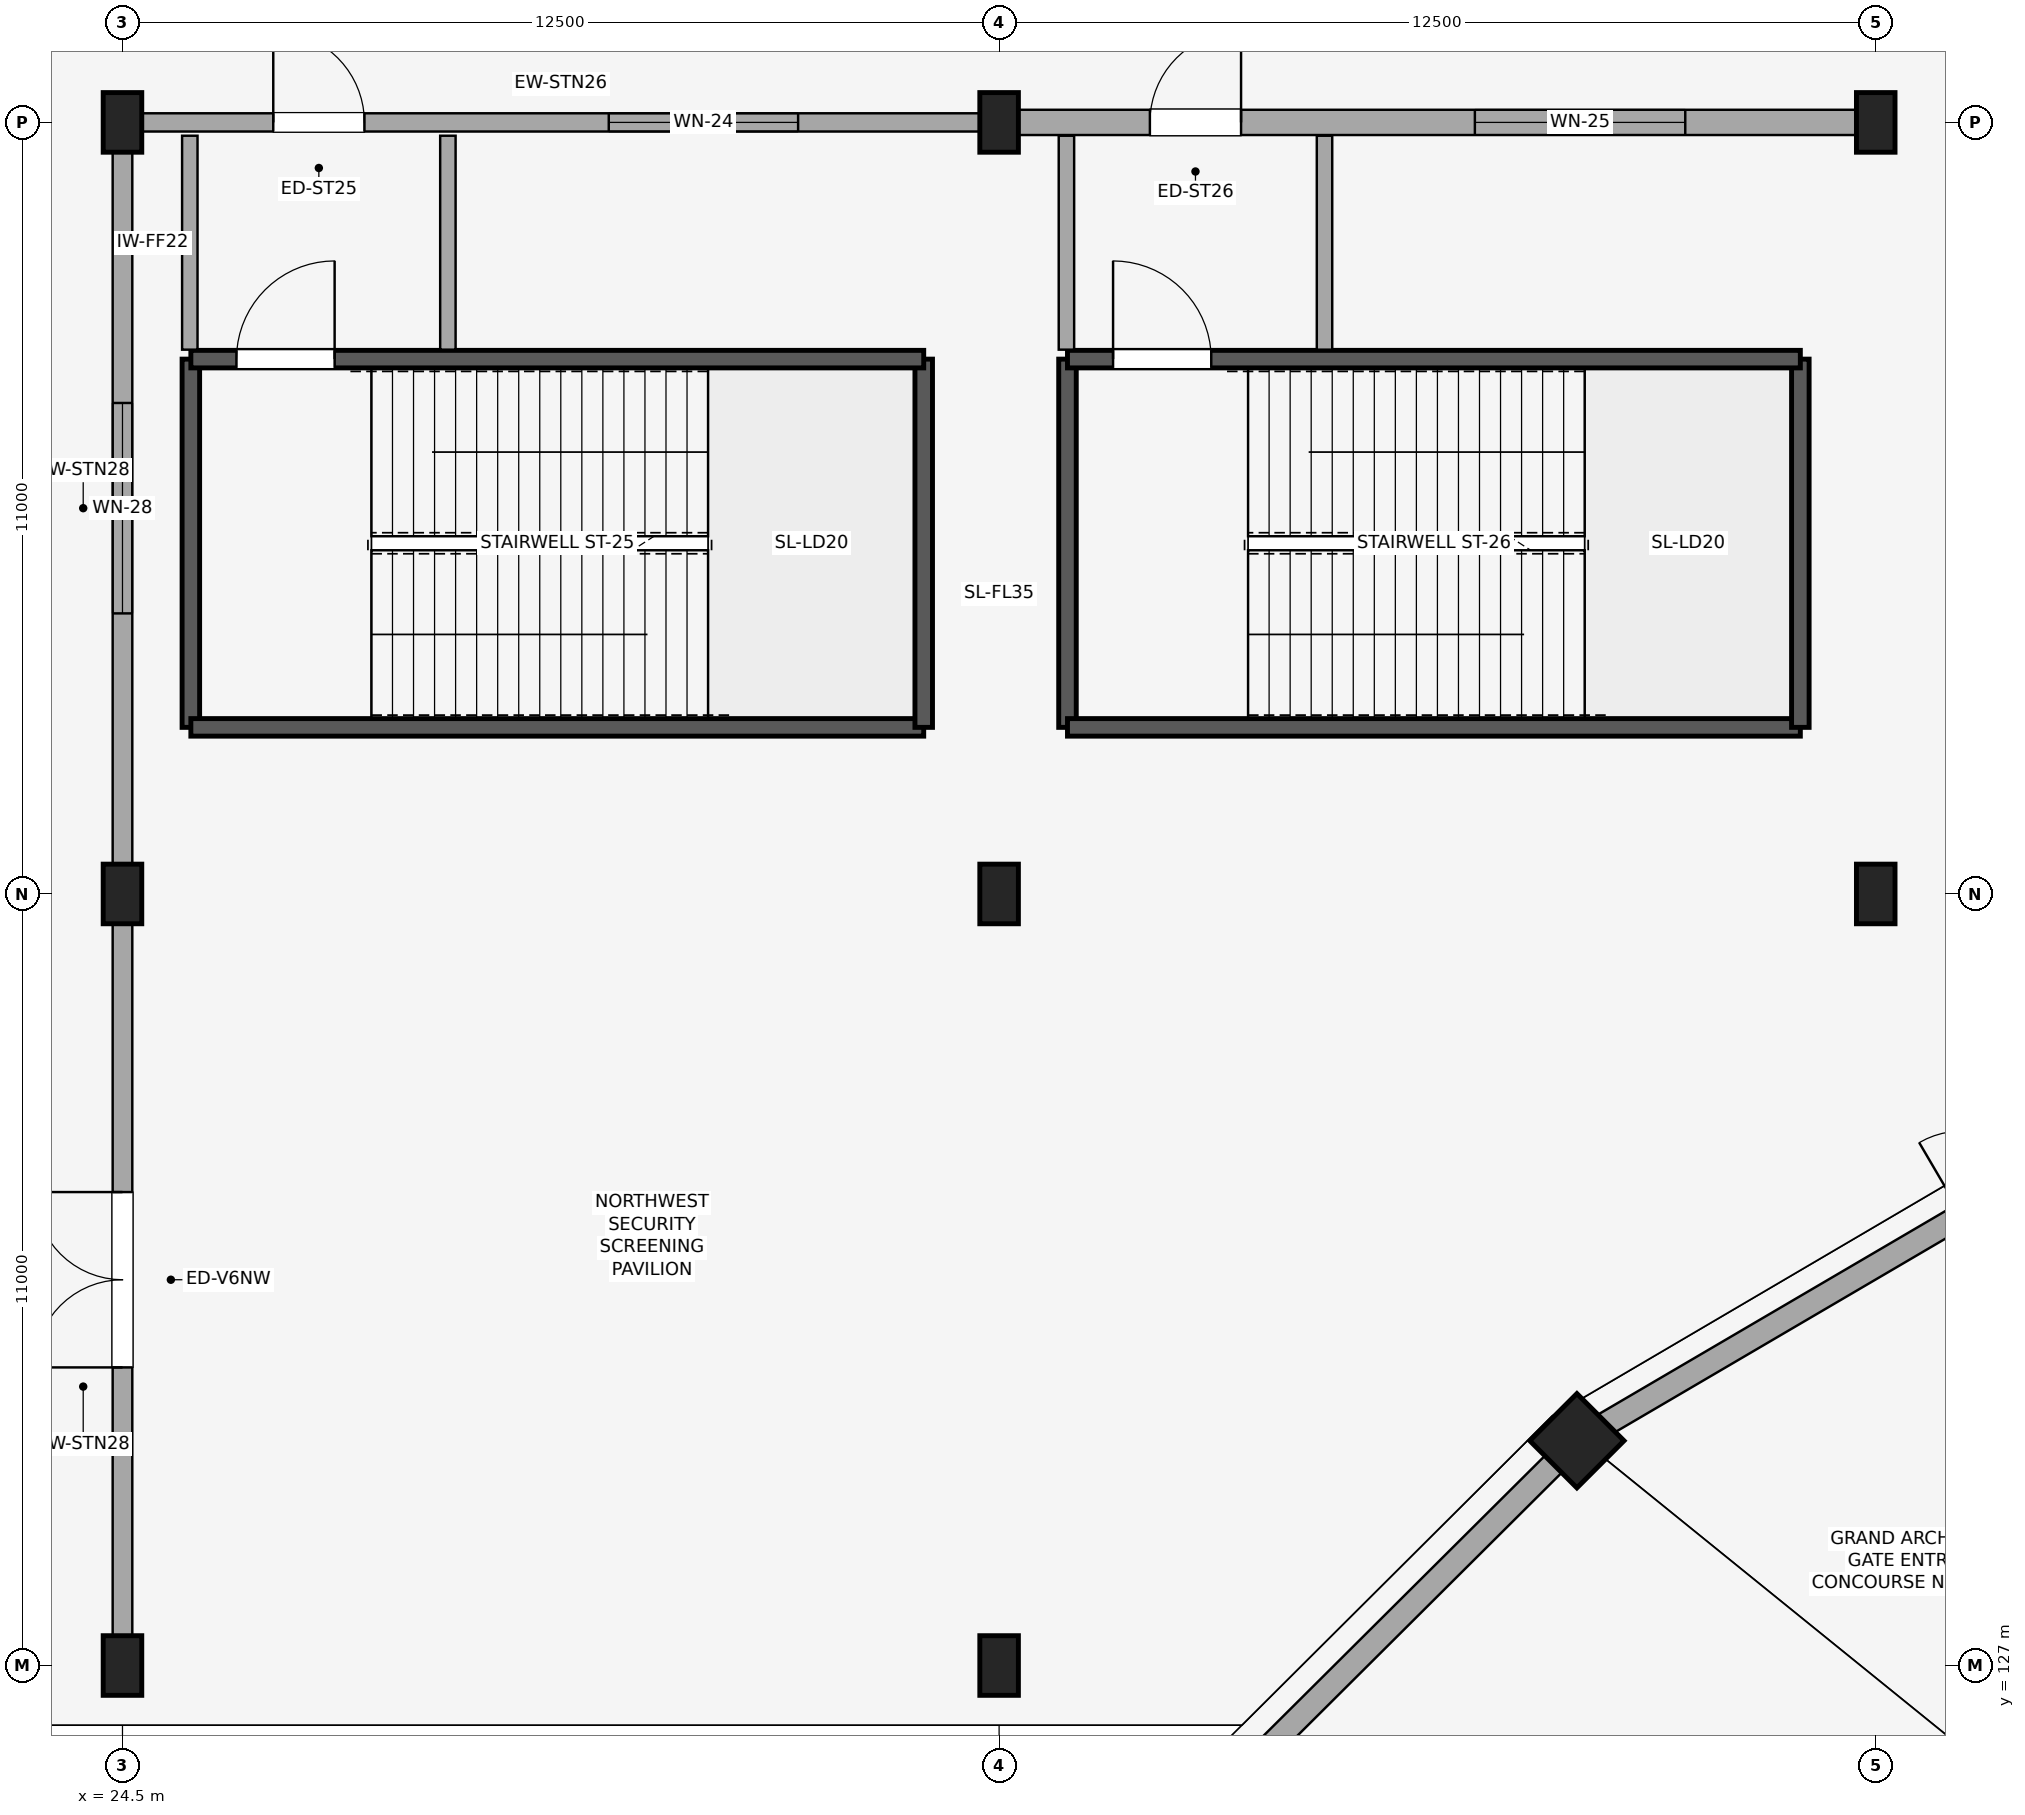
"""IFC4 building model, lengths in metres.
Left out: names, types, materials, properties, quantities, classifications, styles, units other than length and angle.
Written with IfcOpenShell. Run it as: python <this file> out.ifc"""

import sys

from ifc_helpers import new_model, si_unit, direction, frame, frame_2d, origin, origin_2d, place, context, subcontext, project, spatial, rectangle, circle, extrude, element, fill, save


model = new_model("IFC4")
c1 = context("Model", 3, precision=1e-05, world=origin(), true_north=direction((0.0, 1.0)))
c2 = subcontext(c1, "Body", "Model", "MODEL_VIEW")
j1 = project(units=[si_unit("LENGTHUNIT", "METRE"), si_unit("PLANEANGLEUNIT", "RADIAN")], contexts=[c1])
p1 = place(None, origin())
s1 = spatial("IfcSite", under=j1, at=p1, CompositionType="ELEMENT")
p2 = place(p1, origin())
s2 = spatial("IfcBuilding", under=s1, at=p2, CompositionType="ELEMENT")
p3 = place(p2, origin())
s3 = spatial("IfcBuildingStorey", under=s2, at=p3, CompositionType="ELEMENT", Elevation=0.0)
p4 = place(p3, frame((45.239, 130.205, 0.0), z_axis=(0.0, 0.0, 1.0), x_axis=(-0.707106781187, 0.707106781187, 0.0)))
e1 = element("IfcColumn", 1, at=p4, inside=s3, PredefinedType="COLUMN", context=c2, shape_type="SweptSolid", body=[
    extrude(circle(Radius=0.475, at=origin_2d()), origin(), (0.0, 0.0, 1.0), 5.4),
])
for number, where, z_axis, x_axis in (
    (2, (24.5, 127.0, 0.0), (0.0, 0.0, 1.0), (1.0, 0.0, 0.0)),
    (3, (24.5, 138.0, 0.0), (0.0, 0.0, 1.0), (1.0, 0.0, 0.0)),
    (4, (24.5, 149.0, 0.0), (0.0, 0.0, 1.0), (1.0, 0.0, 0.0)),
    (5, (37.0, 127.0, 0.0), (0.0, 0.0, 1.0), (1.0, 0.0, 0.0)),
    (6, (37.0, 138.0, 0.0), (0.0, 0.0, 1.0), (1.0, 0.0, 0.0)),
    (7, (37.0, 149.0, 0.0), (0.0, 0.0, 1.0), (1.0, 0.0, 0.0)),
    (8, (49.5, 138.0, 0.0), (0.0, 0.0, 1.0), (1.0, 0.0, 0.0)),
    (9, (49.5, 149.0, 0.0), (0.0, 0.0, 1.0), (1.0, 0.0, 0.0)),
):
    element("IfcColumn", number, at=place(p3, frame(where, z_axis=z_axis, x_axis=x_axis)), inside=s3, PredefinedType="PILASTER", context=c2, shape_type="SweptSolid", body=[
        extrude(rectangle(XDim=0.55, YDim=0.85, at=origin_2d()), origin(), (0.0, 0.0, 1.0), 5.4),
    ])
p5 = place(p3, frame((64.103, 141.255, 0.0), z_axis=(0.0, 0.0, 1.0), x_axis=(-0.862843632099, -0.505470935413, 0.0)))
e10 = element("IfcWall", 10, at=p5, inside=s3, PredefinedType="STANDARD", context=c2, shape_type="SweptSolid", body=[
    extrude(rectangle(XDim=21.403, YDim=0.34, at=frame_2d((10.701, 0.0))), origin(), (0.0, 0.0, 1.0), 3.85),
])
p6 = place(p5, frame((5.613, 0.0, 0.0)))
e11 = element("IfcOpeningElement", 11, at=p6, cuts=e10, PredefinedType="OPENING", context=c2, shape_type="SweptSolid", body=[
    extrude(rectangle(XDim=1.3, YDim=2.2, at=frame_2d((0.65, 1.1))), frame((0.0, 0.18, 0.0), z_axis=(0.0, -1.0, 0.0), x_axis=(1.0, 0.0, 0.0)), (0.0, 0.0, 1.0), 0.36),
])
p7 = place(p5, frame((13.103, 0.0, 0.0)))
e12 = element("IfcOpeningElement", 12, at=p7, cuts=e10, PredefinedType="OPENING", context=c2, shape_type="SweptSolid", body=[
    extrude(rectangle(XDim=2.4, YDim=2.4, at=frame_2d((1.2, 1.2))), frame((0.0, 0.18, 0.0), z_axis=(0.0, -1.0, 0.0), x_axis=(1.0, 0.0, 0.0)), (0.0, 0.0, 1.0), 0.36),
])
p8 = place(p3, frame((44.913, 129.88, 0.0), z_axis=(0.0, 0.0, 1.0), x_axis=(-0.708905356977, -0.705303618911, 0.0)))
e13 = element("IfcWall", 13, at=p8, inside=s3, PredefinedType="STANDARD", context=c2, shape_type="SweptSolid", body=[
    extrude(rectangle(XDim=19.928, YDim=0.34, at=frame_2d((9.964, 0.0))), origin(), (0.0, 0.0, 1.0), 3.85),
])
p9 = place(p8, frame((8.739, 0.0, 0.0)))
e14 = element("IfcOpeningElement", 14, at=p9, cuts=e13, PredefinedType="OPENING", context=c2, shape_type="SweptSolid", body=[
    extrude(rectangle(XDim=2.45, YDim=2.4, at=frame_2d((1.225, 1.2))), frame((0.0, 0.18, 0.0), z_axis=(0.0, -1.0, 0.0), x_axis=(1.0, 0.0, 0.0)), (0.0, 0.0, 1.0), 0.36),
])
p10 = place(p3, frame((24.772, 149.0, 0.0), z_axis=(0.0, 0.0, 1.0), x_axis=(1.0, 0.0, 0.0)))
e15 = element("IfcWall", 15, at=p10, inside=s3, PredefinedType="STANDARD", context=c2, shape_type="SweptSolid", body=[
    extrude(rectangle(XDim=11.956, YDim=0.26, at=frame_2d((5.978, 0.0))), origin(), (0.0, 0.0, 1.0), 4.48),
])
p11 = place(p10, frame((1.878, 0.0, 0.0)))
e16 = element("IfcOpeningElement", 16, at=p11, cuts=e15, PredefinedType="OPENING", context=c2, shape_type="SweptSolid", body=[
    extrude(rectangle(XDim=1.3, YDim=2.2, at=frame_2d((0.65, 1.1))), frame((0.0, 0.14, 0.0), z_axis=(0.0, -1.0, 0.0), x_axis=(1.0, 0.0, 0.0)), (0.0, 0.0, 1.0), 0.28),
])
p12 = place(p10, frame((6.662, 0.0, 0.95)))
e17 = element("IfcOpeningElement", 17, at=p12, cuts=e15, PredefinedType="OPENING", context=c2, shape_type="SweptSolid", body=[
    extrude(rectangle(XDim=2.7, YDim=2.1, at=frame_2d((1.35, 1.05))), frame((0.0, 0.14, 0.0), z_axis=(0.0, -1.0, 0.0), x_axis=(1.0, 0.0, 0.0)), (0.0, 0.0, 1.0), 0.28),
])
p13 = place(p3, frame((37.272, 149.0, 0.0), z_axis=(0.0, 0.0, 1.0), x_axis=(1.0, 0.0, 0.0)))
e18 = element("IfcWall", 18, at=p13, inside=s3, PredefinedType="STANDARD", context=c2, shape_type="SweptSolid", body=[
    extrude(rectangle(XDim=11.956, YDim=0.36, at=frame_2d((5.978, 0.0))), origin(), (0.0, 0.0, 1.0), 4.48),
])
p14 = place(p13, frame((1.878, 0.0, 0.0)))
e19 = element("IfcOpeningElement", 19, at=p14, cuts=e18, PredefinedType="OPENING", context=c2, shape_type="SweptSolid", body=[
    extrude(rectangle(XDim=1.3, YDim=2.2, at=frame_2d((0.65, 1.1))), frame((0.0, 0.19, 0.0), z_axis=(0.0, -1.0, 0.0), x_axis=(1.0, 0.0, 0.0)), (0.0, 0.0, 1.0), 0.38),
])
p15 = place(p13, frame((6.512, 0.0, 0.95)))
e20 = element("IfcOpeningElement", 20, at=p15, cuts=e18, PredefinedType="OPENING", context=c2, shape_type="SweptSolid", body=[
    extrude(rectangle(XDim=3.0, YDim=1.35, at=frame_2d((1.5, 0.675))), frame((0.0, 0.19, 0.0), z_axis=(0.0, -1.0, 0.0), x_axis=(1.0, 0.0, 0.0)), (0.0, 0.0, 1.0), 0.38),
])
p16 = place(p3, frame((24.5, 127.422, 0.0), z_axis=(0.0, 0.0, 1.0), x_axis=(0.0, 1.0, 0.0)))
e21 = element("IfcWall", 21, at=p16, inside=s3, PredefinedType="STANDARD", context=c2, shape_type="SweptSolid", body=[
    extrude(rectangle(XDim=10.156, YDim=0.28, at=frame_2d((5.078, 0.0))), origin(), (0.0, 0.0, 1.0), 4.48),
])
p17 = place(p16, frame((3.828, 0.0, 0.0)))
e22 = element("IfcOpeningElement", 22, at=p17, cuts=e21, PredefinedType="OPENING", context=c2, shape_type="SweptSolid", body=[
    extrude(rectangle(XDim=2.5, YDim=2.5, at=frame_2d((1.25, 1.25))), frame((0.0, 0.15, 0.0), z_axis=(0.0, -1.0, 0.0), x_axis=(1.0, 0.0, 0.0)), (0.0, 0.0, 1.0), 0.3),
])
p18 = place(p3, frame((24.5, 138.422, 0.0), z_axis=(0.0, 0.0, 1.0), x_axis=(0.0, 1.0, 0.0)))
e23 = element("IfcWall", 23, at=p18, inside=s3, PredefinedType="STANDARD", context=c2, shape_type="SweptSolid", body=[
    extrude(rectangle(XDim=10.156, YDim=0.28, at=frame_2d((5.078, 0.0))), origin(), (0.0, 0.0, 1.0), 4.48),
])
p19 = place(p18, frame((3.578, 0.0, 0.95)))
e24 = element("IfcOpeningElement", 24, at=p19, cuts=e23, PredefinedType="OPENING", context=c2, shape_type="SweptSolid", body=[
    extrude(rectangle(XDim=3.0, YDim=2.1, at=frame_2d((1.5, 1.05))), frame((0.0, 0.15, 0.0), z_axis=(0.0, -1.0, 0.0), x_axis=(1.0, 0.0, 0.0)), (0.0, 0.0, 1.0), 0.3),
])
p20 = place(p3, frame((25.475, 145.625, 0.0), z_axis=(0.0, 0.0, 1.0), x_axis=(0.0, -1.0, 0.0)))
e25 = element("IfcWall", 25, at=p20, inside=s3, PredefinedType="SHEAR", context=c2, shape_type="SweptSolid", body=[
    extrude(rectangle(XDim=5.25, YDim=0.25, at=frame_2d((2.625, 0.0))), origin(), (0.0, 0.0, 1.0), 5.1),
])
p21 = place(p3, frame((25.475, 140.375, 0.0), z_axis=(0.0, 0.0, 1.0), x_axis=(1.0, 0.0, 0.0)))
e26 = element("IfcWall", 26, at=p21, inside=s3, PredefinedType="SHEAR", context=c2, shape_type="SweptSolid", body=[
    extrude(rectangle(XDim=10.45, YDim=0.25, at=frame_2d((5.225, 0.0))), origin(), (0.0, 0.0, 1.0), 5.1),
])
p22 = place(p3, frame((35.925, 140.375, 0.0), z_axis=(0.0, 0.0, 1.0), x_axis=(0.0, 1.0, 0.0)))
e27 = element("IfcWall", 27, at=p22, inside=s3, PredefinedType="SHEAR", context=c2, shape_type="SweptSolid", body=[
    extrude(rectangle(XDim=5.25, YDim=0.25, at=frame_2d((2.625, 0.0))), origin(), (0.0, 0.0, 1.0), 5.1),
])
p23 = place(p3, frame((35.925, 145.625, 0.0), z_axis=(0.0, 0.0, 1.0), x_axis=(-1.0, 0.0, 0.0)))
e28 = element("IfcWall", 28, at=p23, inside=s3, PredefinedType="SHEAR", context=c2, shape_type="SweptSolid", body=[
    extrude(rectangle(XDim=10.45, YDim=0.25, at=frame_2d((5.225, 0.0))), origin(), (0.0, 0.0, 1.0), 5.1),
])
p24 = place(p23, frame((8.4, 0.0, 0.0)))
e29 = element("IfcOpeningElement", 29, at=p24, cuts=e28, PredefinedType="OPENING", context=c2, shape_type="SweptSolid", body=[
    extrude(rectangle(XDim=1.4, YDim=2.2, at=frame_2d((0.7, 1.1))), frame((0.0, 0.135, 0.0), z_axis=(0.0, -1.0, 0.0), x_axis=(1.0, 0.0, 0.0)), (0.0, 0.0, 1.0), 0.27),
])
for number, where, z_axis, x_axis in (
    (30, (25.46, 145.76, 0.0), (0.0, 0.0, 1.0), (0.0, 1.0, 0.0)),
    (31, (29.14, 145.76, 0.0), (0.0, 0.0, 1.0), (0.0, 1.0, 0.0)),
):
    element("IfcWall", number, at=place(p3, frame(where, z_axis=z_axis, x_axis=x_axis)), inside=s3, PredefinedType="PARTITIONING", context=c2, shape_type="SweptSolid", body=[
        extrude(rectangle(XDim=3.05, YDim=0.22, at=frame_2d((1.525, 0.0))), origin(), (0.0, 0.0, 1.0), 3.69),
    ])
p25 = place(p3, frame((37.975, 145.625, 0.0), z_axis=(0.0, 0.0, 1.0), x_axis=(0.0, -1.0, 0.0)))
e32 = element("IfcWall", 32, at=p25, inside=s3, PredefinedType="SHEAR", context=c2, shape_type="SweptSolid", body=[
    extrude(rectangle(XDim=5.25, YDim=0.25, at=frame_2d((2.625, 0.0))), origin(), (0.0, 0.0, 1.0), 5.1),
])
p26 = place(p3, frame((37.975, 140.375, 0.0), z_axis=(0.0, 0.0, 1.0), x_axis=(1.0, 0.0, 0.0)))
e33 = element("IfcWall", 33, at=p26, inside=s3, PredefinedType="SHEAR", context=c2, shape_type="SweptSolid", body=[
    extrude(rectangle(XDim=10.45, YDim=0.25, at=frame_2d((5.225, 0.0))), origin(), (0.0, 0.0, 1.0), 5.1),
])
p27 = place(p3, frame((48.425, 140.375, 0.0), z_axis=(0.0, 0.0, 1.0), x_axis=(0.0, 1.0, 0.0)))
e34 = element("IfcWall", 34, at=p27, inside=s3, PredefinedType="SHEAR", context=c2, shape_type="SweptSolid", body=[
    extrude(rectangle(XDim=5.25, YDim=0.25, at=frame_2d((2.625, 0.0))), origin(), (0.0, 0.0, 1.0), 5.1),
])
p28 = place(p3, frame((48.425, 145.625, 0.0), z_axis=(0.0, 0.0, 1.0), x_axis=(-1.0, 0.0, 0.0)))
e35 = element("IfcWall", 35, at=p28, inside=s3, PredefinedType="SHEAR", context=c2, shape_type="SweptSolid", body=[
    extrude(rectangle(XDim=10.45, YDim=0.25, at=frame_2d((5.225, 0.0))), origin(), (0.0, 0.0, 1.0), 5.1),
])
p29 = place(p28, frame((8.4, 0.0, 0.0)))
e36 = element("IfcOpeningElement", 36, at=p29, cuts=e35, PredefinedType="OPENING", context=c2, shape_type="SweptSolid", body=[
    extrude(rectangle(XDim=1.4, YDim=2.2, at=frame_2d((0.7, 1.1))), frame((0.0, 0.135, 0.0), z_axis=(0.0, -1.0, 0.0), x_axis=(1.0, 0.0, 0.0)), (0.0, 0.0, 1.0), 0.27),
])
for number, where, z_axis, x_axis in (
    (37, (37.96, 145.76, 0.0), (0.0, 0.0, 1.0), (0.0, 1.0, 0.0)),
    (38, (41.64, 145.76, 0.0), (0.0, 0.0, 1.0), (0.0, 1.0, 0.0)),
):
    element("IfcWall", number, at=place(p3, frame(where, z_axis=z_axis, x_axis=x_axis)), inside=s3, PredefinedType="PARTITIONING", context=c2, shape_type="SweptSolid", body=[
        extrude(rectangle(XDim=3.05, YDim=0.22, at=frame_2d((1.525, 0.0))), origin(), (0.0, 0.0, 1.0), 3.69),
    ])
p30 = place(p11, origin())
e39 = element("IfcDoor", 39, at=p30, inside=s3, OperationType="SINGLE_SWING_LEFT", PredefinedType="DOOR", context=c2, shape_type="SweptSolid", body=[
    extrude(rectangle(XDim=1.3, YDim=2.2, at=frame_2d((0.65, 1.1))), frame((0.0, 0.025, 0.0), z_axis=(0.0, -1.0, 0.0), x_axis=(1.0, 0.0, 0.0)), (0.0, 0.0, 1.0), 0.05),
])
fill(e16, e39)
p31 = place(p12, origin())
e40 = element("IfcWindow", 40, at=p31, inside=s3, PartitioningType="SINGLE_PANEL", PredefinedType="WINDOW", context=c2, shape_type="SweptSolid", body=[
    extrude(rectangle(XDim=2.7, YDim=2.1, at=frame_2d((1.35, 1.05))), frame((0.0, 0.03, 0.0), z_axis=(0.0, -1.0, 0.0), x_axis=(1.0, 0.0, 0.0)), (0.0, 0.0, 1.0), 0.06),
])
fill(e17, e40)
p32 = place(p14, origin())
e41 = element("IfcDoor", 41, at=p32, inside=s3, OperationType="SINGLE_SWING_RIGHT", PredefinedType="DOOR", context=c2, shape_type="SweptSolid", body=[
    extrude(rectangle(XDim=1.3, YDim=2.2, at=frame_2d((0.65, 1.1))), frame((0.0, 0.025, 0.0), z_axis=(0.0, -1.0, 0.0), x_axis=(1.0, 0.0, 0.0)), (0.0, 0.0, 1.0), 0.05),
])
fill(e19, e41)
p33 = place(p15, origin())
e42 = element("IfcWindow", 42, at=p33, inside=s3, PartitioningType="SINGLE_PANEL", PredefinedType="WINDOW", context=c2, shape_type="SweptSolid", body=[
    extrude(rectangle(XDim=3.0, YDim=1.35, at=frame_2d((1.5, 0.675))), frame((0.0, 0.03, 0.0), z_axis=(0.0, -1.0, 0.0), x_axis=(1.0, 0.0, 0.0)), (0.0, 0.0, 1.0), 0.06),
])
fill(e20, e42)
p34 = place(p17, origin())
e43 = element("IfcDoor", 43, at=p34, inside=s3, OperationType="DOUBLE_DOOR_SINGLE_SWING", PredefinedType="DOOR", context=c2, shape_type="SweptSolid", body=[
    extrude(rectangle(XDim=2.5, YDim=2.5, at=frame_2d((1.25, 1.25))), frame((0.0, 0.025, 0.0), z_axis=(0.0, -1.0, 0.0), x_axis=(1.0, 0.0, 0.0)), (0.0, 0.0, 1.0), 0.05),
])
fill(e22, e43)
p35 = place(p19, origin())
e44 = element("IfcWindow", 44, at=p35, inside=s3, PartitioningType="SINGLE_PANEL", PredefinedType="WINDOW", context=c2, shape_type="SweptSolid", body=[
    extrude(rectangle(XDim=3.0, YDim=2.1, at=frame_2d((1.5, 1.05))), frame((0.0, 0.03, 0.0), z_axis=(0.0, -1.0, 0.0), x_axis=(1.0, 0.0, 0.0)), (0.0, 0.0, 1.0), 0.06),
])
fill(e24, e44)
p36 = place(p24, frame((1.4, 0.0, 0.0), z_axis=(0.0, 0.0, 1.0), x_axis=(-1.0, 0.0, 0.0)))
e45 = element("IfcDoor", 45, at=p36, inside=s3, OperationType="SINGLE_SWING_RIGHT", PredefinedType="DOOR", context=c2, shape_type="SweptSolid", body=[
    extrude(rectangle(XDim=1.4, YDim=2.2, at=frame_2d((0.7, 1.1))), frame((0.0, 0.025, 0.0), z_axis=(0.0, -1.0, 0.0), x_axis=(1.0, 0.0, 0.0)), (0.0, 0.0, 1.0), 0.05),
])
fill(e29, e45)
p37 = place(p29, frame((1.4, 0.0, 0.0), z_axis=(0.0, 0.0, 1.0), x_axis=(-1.0, 0.0, 0.0)))
e46 = element("IfcDoor", 46, at=p37, inside=s3, OperationType="SINGLE_SWING_LEFT", PredefinedType="DOOR", context=c2, shape_type="SweptSolid", body=[
    extrude(rectangle(XDim=1.4, YDim=2.2, at=frame_2d((0.7, 1.1))), frame((0.0, 0.025, 0.0), z_axis=(0.0, -1.0, 0.0), x_axis=(1.0, 0.0, 0.0)), (0.0, 0.0, 1.0), 0.05),
])
fill(e36, e46)
save(model, sys.argv[1])
